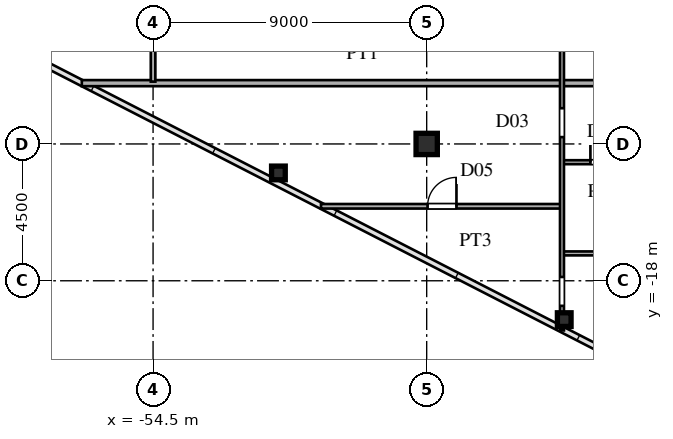
"""IFC4 building model, lengths in metres.
Left out: names, types, materials, properties, quantities, classifications, styles, units other than length and angle.
Written with IfcOpenShell. Run it as: python <this file> out.ifc"""

import sys

from ifc_helpers import new_model, si_unit, direction, frame, frame_2d, origin, origin_2d, place, context, subcontext, project, spatial, rectangle, hollow_rectangle, i_section, extrude, source, transform, mapped, element, fill, save


model = new_model("IFC4")
c1 = context("Model", 3, precision=1e-05, world=origin(), true_north=direction((0.0, 1.0)))
c2 = subcontext(c1, "Body", "Model", "MODEL_VIEW")
j1 = project(units=[si_unit("LENGTHUNIT", "METRE"), si_unit("PLANEANGLEUNIT", "RADIAN")], contexts=[c1])
p1 = place(None, origin())
s1 = spatial("IfcSite", under=j1, at=p1, CompositionType="ELEMENT")
p2 = place(p1, origin())
s2 = spatial("IfcBuilding", under=s1, at=p2, CompositionType="ELEMENT")
p3 = place(p2, frame((0.0, 0.0, 147.6)))
s3 = spatial("IfcBuildingStorey", under=s2, at=p3, CompositionType="ELEMENT", Elevation=147.6)
m1 = source(origin(), c2, "Body", "SweptSolid", [
    extrude(i_section(OverallWidth=0.7, OverallDepth=0.7, WebThickness=0.028, FlangeThickness=0.045, at=origin_2d()), origin(), (0.0, 0.0, 1.0), 3.6),
])
p4 = place(p3, frame((-45.5, -13.5, 0.0), z_axis=(0.0, 0.0, 1.0), x_axis=(1.0, 0.0, 0.0)))
e1 = element("IfcColumn", 1, at=p4, inside=s3, PredefinedType="COLUMN", context=c2, shape_type="MappedRepresentation", body=[
    mapped(m1, transform((0.0, 0.0, 0.0), scale=1.0)),
])
m2 = source(origin(), c2, "Body", "SweptSolid", [
    extrude(hollow_rectangle(XDim=0.45, YDim=0.45, WallThickness=0.018, at=origin_2d()), origin(), (0.0, 0.0, 1.0), 3.6),
])
for number, where, z_axis, x_axis in (
    (2, (-40.976, -19.278, 0.0), (0.0, 0.0, 1.0), (1.0, 0.0, 0.0)),
    (3, (-50.377, -14.453, 0.0), (0.0, 0.0, 1.0), (1.0, 0.0, 0.0)),
):
    element("IfcColumn", number, at=place(p3, frame(where, z_axis=z_axis, x_axis=x_axis)), inside=s3, PredefinedType="COLUMN", context=c2, shape_type="MappedRepresentation", body=[
        mapped(m2, transform((0.0, 0.0, 0.0), scale=1.0)),
    ])
p5 = place(p3, frame((-41.0, -17.1, 0.0), z_axis=(0.0, 0.0, 1.0), x_axis=(1.0, 0.0, 0.0)))
e4 = element("IfcWall", 4, at=p5, inside=s3, PredefinedType="PARTITIONING", context=c2, shape_type="SweptSolid", body=[
    extrude(rectangle(XDim=4.45, YDim=0.13, at=frame_2d((2.225, 0.0))), origin(), (0.0, 0.0, 1.0), 3.38),
])
p6 = place(p3, frame((-48.977, -15.55, 0.0), z_axis=(0.0, 0.0, 1.0), x_axis=(1.0, 0.0, 0.0)))
e5 = element("IfcWall", 5, at=p6, inside=s3, PredefinedType="PARTITIONING", context=c2, shape_type="SweptSolid", body=[
    extrude(rectangle(XDim=7.877, YDim=0.15, at=frame_2d((3.938, 0.0))), origin(), (0.0, 0.0, 1.0), 3.38),
])
p7 = place(p6, frame((3.506, 0.0, 0.0)))
e6 = element("IfcOpeningElement", 6, at=p7, cuts=e5, PredefinedType="OPENING", context=c2, shape_type="SweptSolid", body=[
    extrude(rectangle(XDim=0.95, YDim=2.15, at=frame_2d((0.475, 1.075))), frame((0.0, 0.085, 0.0), z_axis=(0.0, -1.0, 0.0), x_axis=(1.0, 0.0, 0.0)), (0.0, 0.0, 1.0), 0.17),
])
p8 = place(p3, frame((-41.0, -14.1, 0.0), z_axis=(0.0, 0.0, 1.0), x_axis=(1.0, 0.0, 0.0)))
e7 = element("IfcWall", 7, at=p8, inside=s3, PredefinedType="PARTITIONING", context=c2, shape_type="SweptSolid", body=[
    extrude(rectangle(XDim=2.65, YDim=0.13, at=frame_2d((1.325, 0.0))), origin(), (0.0, 0.0, 1.0), 3.38),
])
p9 = place(p8, frame((0.885, 0.0, 0.0)))
e8 = element("IfcOpeningElement", 8, at=p9, cuts=e7, PredefinedType="OPENING", context=c2, shape_type="SweptSolid", body=[
    extrude(rectangle(XDim=0.88, YDim=2.1, at=frame_2d((0.44, 1.05))), frame((0.0, 0.075, 0.0), z_axis=(0.0, -1.0, 0.0), x_axis=(1.0, 0.0, 0.0)), (0.0, 0.0, 1.0), 0.15),
])
p10 = place(p3, frame((-56.844, -11.5, 0.0), z_axis=(0.0, 0.0, 1.0), x_axis=(1.0, 0.0, 0.0)))
e9 = element("IfcWall", 9, at=p10, inside=s3, PredefinedType="PARTITIONING", context=c2, shape_type="SweptSolid", body=[
    extrude(rectangle(XDim=18.464, YDim=0.2, at=frame_2d((9.232, 0.0))), origin(), (0.0, 0.0, 1.0), 3.38),
])
p11 = place(p3, frame((-54.5, -11.45, 0.0), z_axis=(0.0, 0.0, 1.0), x_axis=(0.0, 1.0, 0.0)))
e10 = element("IfcWall", 10, at=p11, inside=s3, PredefinedType="PARTITIONING", context=c2, shape_type="SweptSolid", body=[
    extrude(rectangle(XDim=21.4, YDim=0.15, at=frame_2d((10.7, 0.0))), origin(), (0.0, 0.0, 1.0), 2.78),
])
p12 = place(p11, frame((5.225, 0.0, 0.0)))
e11 = element("IfcOpeningElement", 11, at=p12, cuts=e10, PredefinedType="OPENING", context=c2, shape_type="SweptSolid", body=[
    extrude(rectangle(XDim=0.95, YDim=2.15, at=frame_2d((0.475, 1.075))), frame((0.0, 0.085, 0.0), z_axis=(0.0, -1.0, 0.0), x_axis=(1.0, 0.0, 0.0)), (0.0, 0.0, 1.0), 0.17),
])
p13 = place(p11, frame((1.392, 0.0, 0.0)))
e12 = element("IfcOpeningElement", 12, at=p13, cuts=e10, PredefinedType="OPENING", context=c2, shape_type="SweptSolid", body=[
    extrude(rectangle(XDim=0.95, YDim=2.15, at=frame_2d((0.475, 1.075))), frame((0.0, 0.085, 0.0), z_axis=(0.0, -1.0, 0.0), x_axis=(1.0, 0.0, 0.0)), (0.0, 0.0, 1.0), 0.17),
])
p14 = place(p11, frame((9.058, 0.0, 0.0)))
e13 = element("IfcOpeningElement", 13, at=p14, cuts=e10, PredefinedType="OPENING", context=c2, shape_type="SweptSolid", body=[
    extrude(rectangle(XDim=0.95, YDim=2.15, at=frame_2d((0.475, 1.075))), frame((0.0, 0.085, 0.0), z_axis=(0.0, -1.0, 0.0), x_axis=(1.0, 0.0, 0.0)), (0.0, 0.0, 1.0), 0.17),
])
p15 = place(p11, frame((13.475, 0.0, 0.0)))
e14 = element("IfcOpeningElement", 14, at=p15, cuts=e10, PredefinedType="OPENING", context=c2, shape_type="SweptSolid", body=[
    extrude(rectangle(XDim=0.95, YDim=2.15, at=frame_2d((0.475, 1.075))), frame((0.0, 0.085, 0.0), z_axis=(0.0, -1.0, 0.0), x_axis=(1.0, 0.0, 0.0)), (0.0, 0.0, 1.0), 0.17),
])
p16 = place(p3, frame((-41.05, -19.634, 0.0), z_axis=(0.0, 0.0, 1.0), x_axis=(0.0, 1.0, 0.0)))
e15 = element("IfcWall", 15, at=p16, inside=s3, PredefinedType="PARTITIONING", context=c2, shape_type="SweptSolid", body=[
    extrude(rectangle(XDim=11.187, YDim=0.13, at=frame_2d((5.594, 0.0))), origin(), (0.0, 0.0, 1.0), 2.99),
])
p17 = place(p16, frame((6.359, 0.0, 0.0)))
e16 = element("IfcOpeningElement", 16, at=p17, cuts=e15, PredefinedType="OPENING", context=c2, shape_type="SweptSolid", body=[
    extrude(rectangle(XDim=0.95, YDim=2.15, at=frame_2d((0.475, 1.075))), frame((0.0, 0.075, 0.0), z_axis=(0.0, -1.0, 0.0), x_axis=(1.0, 0.0, 0.0)), (0.0, 0.0, 1.0), 0.15),
])
p18 = place(p16, frame((0.809, 0.0, 0.0)))
e17 = element("IfcOpeningElement", 17, at=p18, cuts=e15, PredefinedType="OPENING", context=c2, shape_type="SweptSolid", body=[
    extrude(rectangle(XDim=0.95, YDim=2.15, at=frame_2d((0.475, 1.075))), frame((0.0, 0.075, 0.0), z_axis=(0.0, -1.0, 0.0), x_axis=(1.0, 0.0, 0.0)), (0.0, 0.0, 1.0), 0.15),
])
m3 = source(origin(), c2, "Body", "SweptSolid", [
    extrude(rectangle(XDim=0.95, YDim=2.15, at=frame_2d((0.475, 1.075))), frame((0.0, 0.025, 0.0), z_axis=(0.0, -1.0, 0.0), x_axis=(1.0, 0.0, 0.0)), (0.0, 0.0, 1.0), 0.05),
])
p19 = place(p7, origin())
e18 = element("IfcDoor", 18, at=p19, inside=s3, OperationType="SINGLE_SWING_RIGHT", PredefinedType="DOOR", context=c2, shape_type="MappedRepresentation", body=[
    mapped(m3, transform((0.0, 0.0, 0.0), scale=1.0)),
])
fill(e6, e18)
m4 = source(origin(), c2, "Body", "SweptSolid", [
    extrude(rectangle(XDim=0.88, YDim=2.1, at=frame_2d((0.44, 1.05))), frame((0.0, 0.025, 0.0), z_axis=(0.0, -1.0, 0.0), x_axis=(1.0, 0.0, 0.0)), (0.0, 0.0, 1.0), 0.05),
])
p20 = place(p9, origin())
e19 = element("IfcDoor", 19, at=p20, inside=s3, OperationType="SINGLE_SWING_LEFT", PredefinedType="DOOR", context=c2, shape_type="MappedRepresentation", body=[
    mapped(m4, transform((0.0, 0.0, 0.0), scale=1.0)),
])
fill(e8, e19)
save(model, sys.argv[1])
